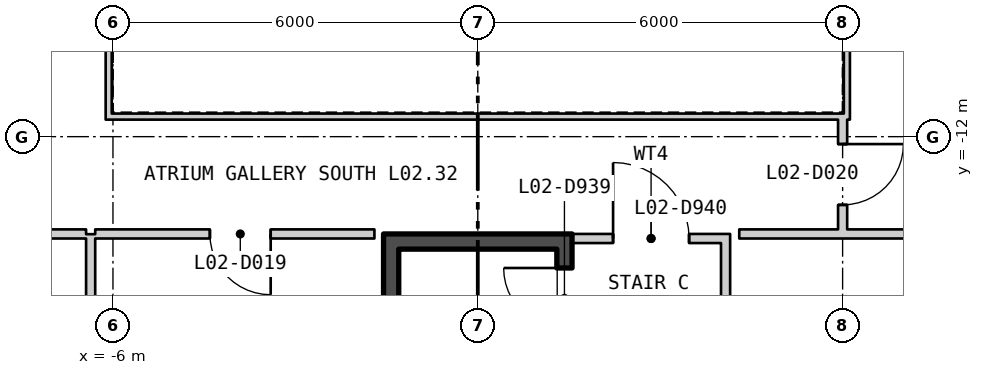
"""IFC4 building model, lengths in metres.
Left out: names, types, materials, properties, quantities, classifications, styles, units other than length and angle.
Written with IfcOpenShell. Run it as: python <this file> out.ifc"""

import sys

from ifc_helpers import new_model, si_unit, direction, frame, frame_2d, origin, place, context, subcontext, project, spatial, rectangle, extrude, element, fill, save


model = new_model("IFC4")
c1 = context("Model", 3, precision=1e-05, world=origin(), true_north=direction((0.0, 1.0)))
c2 = subcontext(c1, "Body", "Model", "MODEL_VIEW")
j1 = project(units=[si_unit("LENGTHUNIT", "METRE"), si_unit("PLANEANGLEUNIT", "RADIAN")], contexts=[c1])
p1 = place(None, origin())
s1 = spatial("IfcSite", under=j1, at=p1, CompositionType="ELEMENT")
p2 = place(p1, origin())
s2 = spatial("IfcBuilding", under=s1, at=p2, CompositionType="ELEMENT")
p3 = place(p2, frame((0.0, 0.0, 13.5)))
s3 = spatial("IfcBuildingStorey", under=s2, at=p3, CompositionType="ELEMENT", Elevation=13.5)
p4 = place(p3, frame((-6.12, -11.67, 0.0), z_axis=(0.0, 0.0, 1.0), x_axis=(1.0, 0.0, 0.0)))
e1 = element("IfcWall", 1, at=p4, inside=s3, PredefinedType="PARTITIONING", context=c2, shape_type="SweptSolid", body=[
    extrude(rectangle(XDim=12.24, YDim=0.1, at=frame_2d((6.12, 0.0))), origin(), (0.0, 0.0, 1.0), 4.88),
])
for number, where, z_axis, x_axis in (
    (2, (6.07, -11.62, 0.0), (0.0, 0.0, 1.0), (0.0, 1.0, 0.0)),
    (3, (-6.07, -3.58, 0.0), (0.0, 0.0, 1.0), (0.0, -1.0, 0.0)),
):
    element("IfcWall", number, at=place(p3, frame(where, z_axis=z_axis, x_axis=x_axis)), inside=s3, PredefinedType="PARTITIONING", context=c2, shape_type="SweptSolid", body=[
        extrude(rectangle(XDim=8.04, YDim=0.1, at=frame_2d((4.02, 0.0))), origin(), (0.0, 0.0, 1.0), 4.88),
    ])
p5 = place(p3, frame((-1.425, -21.05, 0.0), z_axis=(0.0, 0.0, 1.0), x_axis=(0.0, 1.0, 0.0)))
e4 = element("IfcWall", 4, at=p5, inside=s3, PredefinedType="SHEAR", context=c2, shape_type="SweptSolid", body=[
    extrude(rectangle(XDim=7.2, YDim=0.25, at=frame_2d((3.6, 0.0))), origin(), (0.0, 0.0, 1.0), 4.88),
])
p6 = place(p3, frame((1.425, -21.05, 0.0), z_axis=(0.0, 0.0, 1.0), x_axis=(0.0, 1.0, 0.0)))
e5 = element("IfcWall", 5, at=p6, inside=s3, PredefinedType="SHEAR", context=c2, shape_type="SweptSolid", body=[
    extrude(rectangle(XDim=7.2, YDim=0.25, at=frame_2d((3.6, 0.0))), origin(), (0.0, 0.0, 1.0), 4.88),
])
p7 = place(p6, frame((5.89, 0.0, 0.0)))
e6 = element("IfcOpeningElement", 6, at=p7, cuts=e5, PredefinedType="OPENING", context=c2, shape_type="SweptSolid", body=[
    extrude(rectangle(XDim=1.0, YDim=2.1, at=frame_2d((0.5, 1.05))), frame((0.0, 0.135, 0.0), z_axis=(0.0, -1.0, 0.0), x_axis=(1.0, 0.0, 0.0)), (0.0, 0.0, 1.0), 0.27),
])
p8 = place(p3, frame((-1.55, -13.725, 0.0), z_axis=(0.0, 0.0, 1.0), x_axis=(1.0, 0.0, 0.0)))
e7 = element("IfcWall", 7, at=p8, inside=s3, PredefinedType="SHEAR", context=c2, shape_type="SweptSolid", body=[
    extrude(rectangle(XDim=3.1, YDim=0.25, at=frame_2d((1.55, 0.0))), origin(), (0.0, 0.0, 1.0), 4.88),
])
p9 = place(p3, frame((4.075, -16.15, 0.0), z_axis=(0.0, 0.0, 1.0), x_axis=(0.0, 1.0, 0.0)))
e8 = element("IfcWall", 8, at=p9, inside=s3, PredefinedType="PARTITIONING", context=c2, shape_type="SweptSolid", body=[
    extrude(rectangle(XDim=2.4, YDim=0.15, at=frame_2d((1.2, 0.0))), origin(), (0.0, 0.0, 1.0), 4.88),
])
p10 = place(p3, frame((1.55, -13.675, 0.0), z_axis=(0.0, 0.0, 1.0), x_axis=(1.0, 0.0, 0.0)))
e9 = element("IfcWall", 9, at=p10, inside=s3, PredefinedType="PARTITIONING", context=c2, shape_type="SweptSolid", body=[
    extrude(rectangle(XDim=2.6, YDim=0.15, at=frame_2d((1.3, 0.0))), origin(), (0.0, 0.0, 1.0), 3.97),
])
p11 = place(p10, frame((0.675, 0.0, 0.0)))
e10 = element("IfcOpeningElement", 10, at=p11, cuts=e9, PredefinedType="OPENING", context=c2, shape_type="SweptSolid", body=[
    extrude(rectangle(XDim=1.25, YDim=2.1, at=frame_2d((0.625, 1.05))), frame((0.0, 0.085, 0.0), z_axis=(0.0, -1.0, 0.0), x_axis=(1.0, 0.0, 0.0)), (0.0, 0.0, 1.0), 0.17),
])
p12 = place(p3, frame((-8.15, -13.6, 0.0), z_axis=(0.0, 0.0, 1.0), x_axis=(1.0, 0.0, 0.0)))
e11 = element("IfcWall", 11, at=p12, inside=s3, PredefinedType="PARTITIONING", context=c2, shape_type="SweptSolid", body=[
    extrude(rectangle(XDim=1.708, YDim=0.15, at=frame_2d((0.854, 0.0))), origin(), (0.0, 0.0, 1.0), 3.97),
])
p13 = place(p3, frame((-6.367, -21.225, 0.0), z_axis=(0.0, 0.0, 1.0), x_axis=(0.0, 1.0, 0.0)))
e12 = element("IfcWall", 12, at=p13, inside=s3, PredefinedType="PARTITIONING", context=c2, shape_type="SweptSolid", body=[
    extrude(rectangle(XDim=7.621, YDim=0.15, at=frame_2d((3.811, 0.0))), origin(), (0.0, 0.0, 1.0), 4.28),
])
p14 = place(p3, frame((-6.292, -13.6, 0.0), z_axis=(0.0, 0.0, 1.0), x_axis=(1.0, 0.0, 0.0)))
e13 = element("IfcWall", 13, at=p14, inside=s3, PredefinedType="PARTITIONING", context=c2, shape_type="SweptSolid", body=[
    extrude(rectangle(XDim=4.592, YDim=0.15, at=frame_2d((2.296, 0.0))), origin(), (0.0, 0.0, 1.0), 3.97),
])
p15 = place(p14, frame((1.886, 0.0, 0.0)))
e14 = element("IfcOpeningElement", 14, at=p15, cuts=e13, PredefinedType="OPENING", context=c2, shape_type="SweptSolid", body=[
    extrude(rectangle(XDim=1.0, YDim=2.1, at=frame_2d((0.5, 1.05))), frame((0.0, 0.085, 0.0), z_axis=(0.0, -1.0, 0.0), x_axis=(1.0, 0.0, 0.0)), (0.0, 0.0, 1.0), 0.17),
])
p16 = place(p3, frame((4.3, -13.6, 0.0), z_axis=(0.0, 0.0, 1.0), x_axis=(1.0, 0.0, 0.0)))
e15 = element("IfcWall", 15, at=p16, inside=s3, PredefinedType="PARTITIONING", context=c2, shape_type="SweptSolid", body=[
    extrude(rectangle(XDim=3.85, YDim=0.15, at=frame_2d((1.925, 0.0))), origin(), (0.0, 0.0, 1.0), 3.97),
])
p17 = place(p3, frame((6.0, -13.525, 0.0), z_axis=(0.0, 0.0, 1.0), x_axis=(0.0, 1.0, 0.0)))
e16 = element("IfcWall", 16, at=p17, inside=s3, PredefinedType="PARTITIONING", context=c2, shape_type="SweptSolid", body=[
    extrude(rectangle(XDim=1.805, YDim=0.15, at=frame_2d((0.902, 0.0))), origin(), (0.0, 0.0, 1.0), 4.88),
])
p18 = place(p17, frame((0.403, 0.0, 0.0)))
e17 = element("IfcOpeningElement", 17, at=p18, cuts=e16, PredefinedType="OPENING", context=c2, shape_type="SweptSolid", body=[
    extrude(rectangle(XDim=1.0, YDim=2.1, at=frame_2d((0.5, 1.05))), frame((0.0, 0.085, 0.0), z_axis=(0.0, -1.0, 0.0), x_axis=(1.0, 0.0, 0.0)), (0.0, 0.0, 1.0), 0.17),
])
p19 = place(p7, origin())
e18 = element("IfcDoor", 18, at=p19, inside=s3, OperationType="SINGLE_SWING_LEFT", PredefinedType="DOOR", context=c2, shape_type="SweptSolid", body=[
    extrude(rectangle(XDim=1.0, YDim=2.1, at=frame_2d((0.5, 1.05))), frame((0.0, 0.025, 0.0), z_axis=(0.0, -1.0, 0.0), x_axis=(1.0, 0.0, 0.0)), (0.0, 0.0, 1.0), 0.05),
])
fill(e6, e18)
p20 = place(p11, origin())
e19 = element("IfcDoor", 19, at=p20, inside=s3, OperationType="SINGLE_SWING_RIGHT", PredefinedType="DOOR", context=c2, shape_type="SweptSolid", body=[
    extrude(rectangle(XDim=1.25, YDim=2.1, at=frame_2d((0.625, 1.05))), frame((0.0, 0.025, 0.0), z_axis=(0.0, -1.0, 0.0), x_axis=(1.0, 0.0, 0.0)), (0.0, 0.0, 1.0), 0.05),
])
fill(e10, e19)
p21 = place(p15, origin())
e20 = element("IfcDoor", 20, at=p21, inside=s3, OperationType="SINGLE_SWING_RIGHT", PredefinedType="DOOR", context=c2, shape_type="SweptSolid", body=[
    extrude(rectangle(XDim=1.0, YDim=2.1, at=frame_2d((0.5, 1.05))), frame((0.0, 0.025, 0.0), z_axis=(0.0, -1.0, 0.0), x_axis=(1.0, 0.0, 0.0)), (0.0, 0.0, 1.0), 0.05),
])
fill(e14, e20)
p22 = place(p18, origin())
e21 = element("IfcDoor", 21, at=p22, inside=s3, OperationType="SINGLE_SWING_RIGHT", PredefinedType="DOOR", context=c2, shape_type="SweptSolid", body=[
    extrude(rectangle(XDim=1.0, YDim=2.1, at=frame_2d((0.5, 1.05))), frame((0.0, 0.025, 0.0), z_axis=(0.0, -1.0, 0.0), x_axis=(1.0, 0.0, 0.0)), (0.0, 0.0, 1.0), 0.05),
])
fill(e17, e21)
save(model, sys.argv[1])
